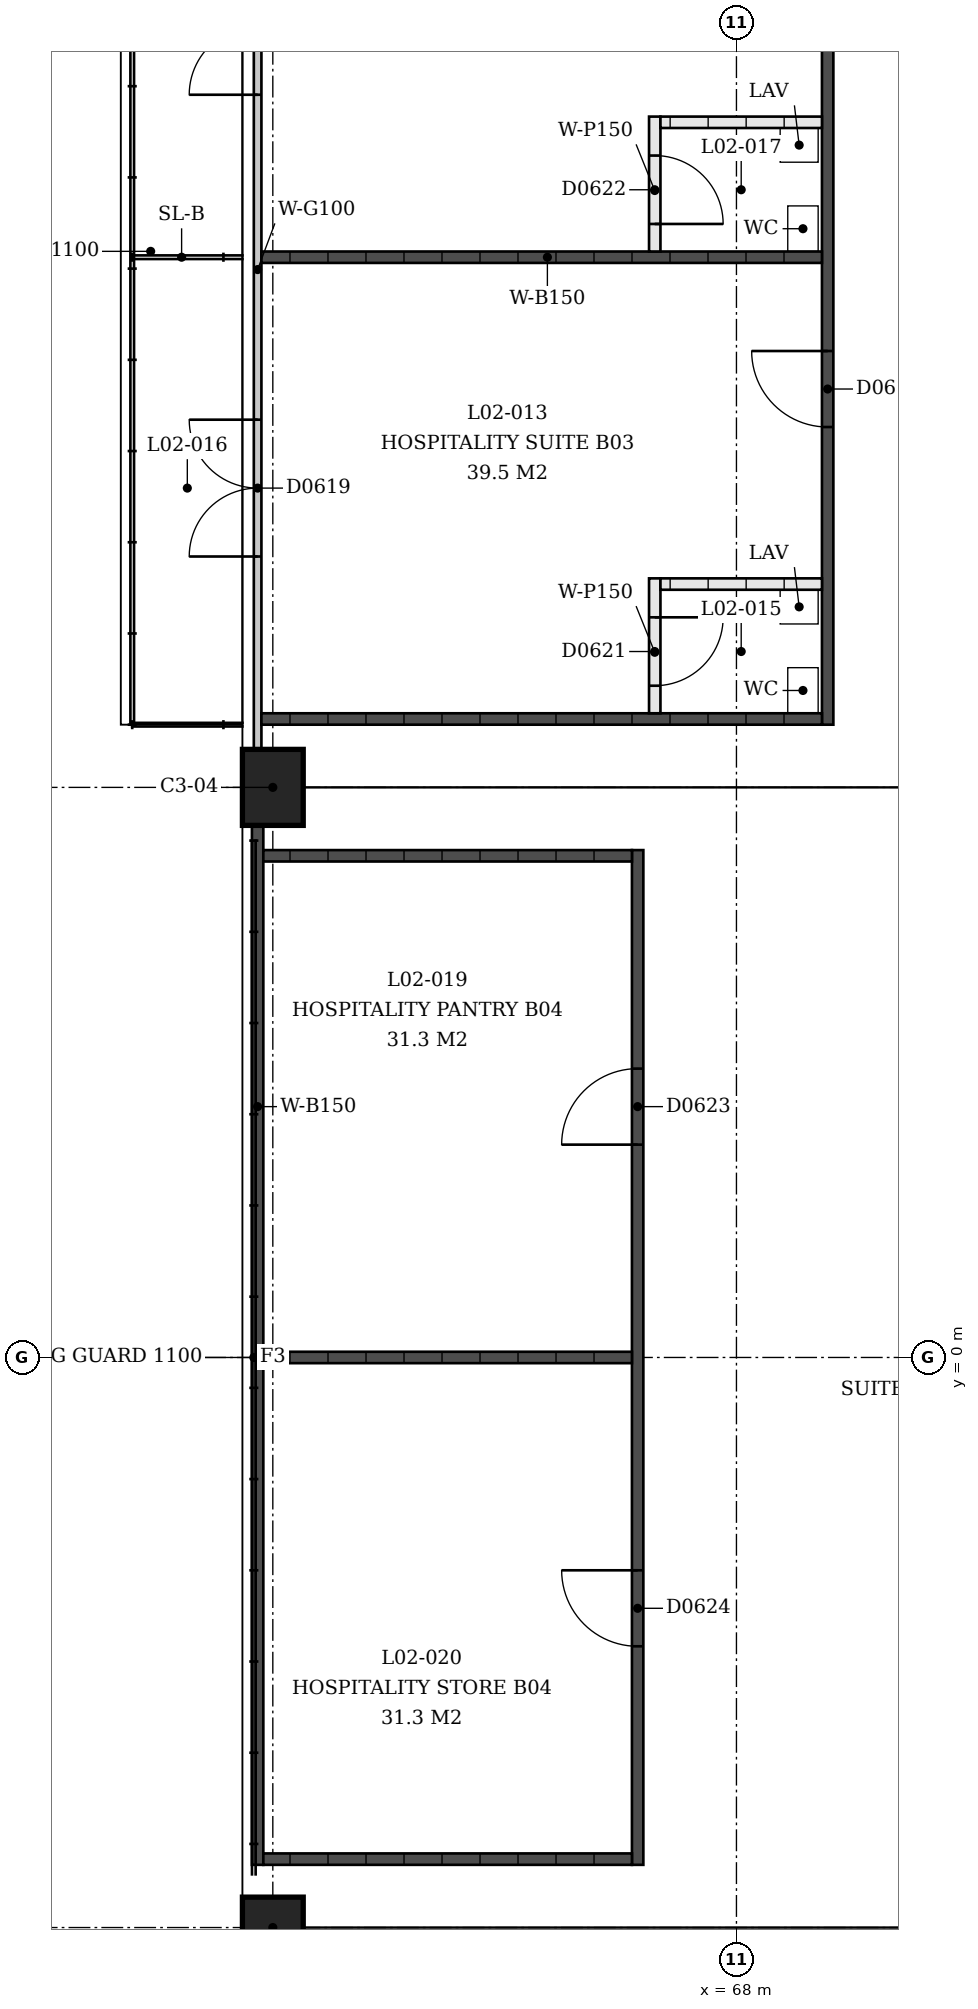
"""IFC4 building model, lengths in metres.
Left out: names, types, materials, properties, quantities, classifications, styles, units other than length and angle.
Written with IfcOpenShell. Run it as: python <this file> out.ifc"""

import sys

from ifc_helpers import new_model, si_unit, direction, frame, frame_2d, origin, origin_2d, place, context, subcontext, project, spatial, rectangle, extrude, element, fill, save


model = new_model("IFC4")
c1 = context("Model", 3, precision=1e-05, world=origin(), true_north=direction((0.0, 1.0)))
c2 = subcontext(c1, "Body", "Model", "MODEL_VIEW")
j1 = project(units=[si_unit("LENGTHUNIT", "METRE"), si_unit("PLANEANGLEUNIT", "RADIAN")], contexts=[c1])
p1 = place(None, origin())
s1 = spatial("IfcSite", under=j1, at=p1, CompositionType="ELEMENT")
p2 = place(p1, origin())
s2 = spatial("IfcBuilding", under=s1, at=p2, CompositionType="ELEMENT")
p3 = place(p2, frame((0.0, 0.0, 9.0)))
s3 = spatial("IfcBuildingStorey", under=s2, at=p3, CompositionType="ELEMENT", Elevation=9.0)
p4 = place(p3, frame((61.9, 7.5, 0.0), z_axis=(0.0, 0.0, 1.0), x_axis=(0.0, 1.0, 0.0)))
e1 = element("IfcColumn", 1, at=p4, inside=s3, PredefinedType="COLUMN", context=c2, shape_type="SweptSolid", body=[
    extrude(rectangle(XDim=1.0, YDim=0.8, at=origin_2d()), origin(), (0.0, 0.0, 1.0), 4.5),
])
p5 = place(p3, frame((61.9, -7.5, 0.0), z_axis=(0.0, 0.0, 1.0), x_axis=(0.0, 1.0, 0.0)))
e2 = element("IfcColumn", 2, at=p5, inside=s3, PredefinedType="COLUMN", context=c2, shape_type="SweptSolid", body=[
    extrude(rectangle(XDim=0.8, YDim=0.8, at=origin_2d()), origin(), (0.0, 0.0, 1.0), 4.5),
])
p6 = place(p3, frame((61.7, 8.0, 0.0), z_axis=(0.0, 0.0, 1.0), x_axis=(0.0, 1.0, 0.0)))
e3 = element("IfcWall", 3, at=p6, inside=s3, PredefinedType="PARTITIONING", context=c2, shape_type="SweptSolid", body=[
    extrude(rectangle(XDim=12.625, YDim=0.1, at=frame_2d((6.312, 0.0))), origin(), (0.0, 0.0, 1.0), 3.0),
])
p7 = place(p6, frame((2.538, 0.0, 0.0)))
e4 = element("IfcOpeningElement", 4, at=p7, cuts=e3, PredefinedType="OPENING", context=c2, shape_type="SweptSolid", body=[
    extrude(rectangle(XDim=1.8, YDim=2.1, at=frame_2d((0.9, 1.05))), frame((0.0, 0.05, 0.0), z_axis=(0.0, -1.0, 0.0), x_axis=(1.0, 0.0, 0.0)), (0.0, 0.0, 1.0), 0.1),
])
p8 = place(p6, frame((8.613, 0.0, 0.0)))
e5 = element("IfcOpeningElement", 5, at=p8, cuts=e3, PredefinedType="OPENING", context=c2, shape_type="SweptSolid", body=[
    extrude(rectangle(XDim=1.8, YDim=2.1, at=frame_2d((0.9, 1.05))), frame((0.0, 0.05, 0.0), z_axis=(0.0, -1.0, 0.0), x_axis=(1.0, 0.0, 0.0)), (0.0, 0.0, 1.0), 0.1),
])
p9 = place(p3, frame((69.2, 8.325, 0.0), z_axis=(0.0, 0.0, 1.0), x_axis=(0.0, 1.0, 0.0)))
e6 = element("IfcWall", 6, at=p9, inside=s3, PredefinedType="SOLIDWALL", context=c2, shape_type="SweptSolid", body=[
    extrude(rectangle(XDim=12.3, YDim=0.15, at=frame_2d((6.15, 0.0))), origin(), (0.0, 0.0, 1.0), 3.0),
])
p10 = place(p9, frame((3.916, 0.0, 0.0)))
e7 = element("IfcOpeningElement", 7, at=p10, cuts=e6, PredefinedType="OPENING", context=c2, shape_type="SweptSolid", body=[
    extrude(rectangle(XDim=1.0, YDim=2.1, at=frame_2d((0.5, 1.05))), frame((0.0, 0.075, 0.0), z_axis=(0.0, -1.0, 0.0), x_axis=(1.0, 0.0, 0.0)), (0.0, 0.0, 1.0), 0.15),
])
p11 = place(p9, frame((9.991, 0.0, 0.0)))
e8 = element("IfcOpeningElement", 8, at=p11, cuts=e6, PredefinedType="OPENING", context=c2, shape_type="SweptSolid", body=[
    extrude(rectangle(XDim=1.0, YDim=2.1, at=frame_2d((0.5, 1.05))), frame((0.0, 0.075, 0.0), z_axis=(0.0, -1.0, 0.0), x_axis=(1.0, 0.0, 0.0)), (0.0, 0.0, 1.0), 0.15),
])
for number, where, z_axis, x_axis in (
    (9, (61.75, 8.4, 0.0), (0.0, 0.0, 1.0), (1.0, 0.0, 0.0)),
    (10, (61.75, 14.475, 0.0), (0.0, 0.0, 1.0), (1.0, 0.0, 0.0)),
):
    element("IfcWall", number, at=place(p3, frame(where, z_axis=z_axis, x_axis=x_axis)), inside=s3, PredefinedType="SOLIDWALL", context=c2, shape_type="SweptSolid", body=[
        extrude(rectangle(XDim=7.375, YDim=0.15, at=frame_2d((3.688, 0.0))), origin(), (0.0, 0.0, 1.0), 3.0),
    ])
p12 = place(p3, frame((66.925, 8.475, 0.0), z_axis=(0.0, 0.0, 1.0), x_axis=(0.0, 1.0, 0.0)))
e11 = element("IfcWall", 11, at=p12, inside=s3, PredefinedType="PARTITIONING", context=c2, shape_type="SweptSolid", body=[
    extrude(rectangle(XDim=1.775, YDim=0.15, at=frame_2d((0.887, 0.0))), origin(), (0.0, 0.0, 1.0), 3.0),
])
p13 = place(p12, frame((0.363, 0.0, 0.0)))
e12 = element("IfcOpeningElement", 12, at=p13, cuts=e11, PredefinedType="OPENING", context=c2, shape_type="SweptSolid", body=[
    extrude(rectangle(XDim=0.9, YDim=2.1, at=frame_2d((0.45, 1.05))), frame((0.0, 0.075, 0.0), z_axis=(0.0, -1.0, 0.0), x_axis=(1.0, 0.0, 0.0)), (0.0, 0.0, 1.0), 0.15),
])
p14 = place(p3, frame((67.0, 10.175, 0.0), z_axis=(0.0, 0.0, 1.0), x_axis=(1.0, 0.0, 0.0)))
e13 = element("IfcWall", 13, at=p14, inside=s3, PredefinedType="PARTITIONING", context=c2, shape_type="SweptSolid", body=[
    extrude(rectangle(XDim=2.125, YDim=0.15, at=frame_2d((1.062, 0.0))), origin(), (0.0, 0.0, 1.0), 3.0),
])
p15 = place(p3, frame((66.925, 14.55, 0.0), z_axis=(0.0, 0.0, 1.0), x_axis=(0.0, 1.0, 0.0)))
e14 = element("IfcWall", 14, at=p15, inside=s3, PredefinedType="PARTITIONING", context=c2, shape_type="SweptSolid", body=[
    extrude(rectangle(XDim=1.775, YDim=0.15, at=frame_2d((0.887, 0.0))), origin(), (0.0, 0.0, 1.0), 3.0),
])
p16 = place(p15, frame((0.363, 0.0, 0.0)))
e15 = element("IfcOpeningElement", 15, at=p16, cuts=e14, PredefinedType="OPENING", context=c2, shape_type="SweptSolid", body=[
    extrude(rectangle(XDim=0.9, YDim=2.1, at=frame_2d((0.45, 1.05))), frame((0.0, 0.075, 0.0), z_axis=(0.0, -1.0, 0.0), x_axis=(1.0, 0.0, 0.0)), (0.0, 0.0, 1.0), 0.15),
])
p17 = place(p3, frame((67.0, 16.25, 0.0), z_axis=(0.0, 0.0, 1.0), x_axis=(1.0, 0.0, 0.0)))
e16 = element("IfcWall", 16, at=p17, inside=s3, PredefinedType="PARTITIONING", context=c2, shape_type="SweptSolid", body=[
    extrude(rectangle(XDim=2.125, YDim=0.15, at=frame_2d((1.062, 0.0))), origin(), (0.0, 0.0, 1.0), 3.0),
])
p18 = place(p3, frame((61.7, 7.0, 0.0), z_axis=(0.0, 0.0, 1.0), x_axis=(0.0, -1.0, 0.0)))
e17 = element("IfcWall", 17, at=p18, inside=s3, PredefinedType="SOLIDWALL", context=c2, shape_type="SweptSolid", body=[
    extrude(rectangle(XDim=13.675, YDim=0.15, at=frame_2d((6.837, 0.0))), origin(), (0.0, 0.0, 1.0), 3.0),
])
p19 = place(p3, frame((66.7, 6.675, 0.0), z_axis=(0.0, 0.0, 1.0), x_axis=(0.0, -1.0, 0.0)))
e18 = element("IfcWall", 18, at=p19, inside=s3, PredefinedType="SOLIDWALL", context=c2, shape_type="SweptSolid", body=[
    extrude(rectangle(XDim=13.35, YDim=0.15, at=frame_2d((6.675, 0.0))), origin(), (0.0, 0.0, 1.0), 3.0),
])
p20 = place(p19, frame((2.875, 0.0, 0.0)))
e19 = element("IfcOpeningElement", 19, at=p20, cuts=e18, PredefinedType="OPENING", context=c2, shape_type="SweptSolid", body=[
    extrude(rectangle(XDim=1.0, YDim=2.1, at=frame_2d((0.5, 1.05))), frame((0.0, 0.075, 0.0), z_axis=(0.0, -1.0, 0.0), x_axis=(1.0, 0.0, 0.0)), (0.0, 0.0, 1.0), 0.15),
])
p21 = place(p19, frame((9.475, 0.0, 0.0)))
e20 = element("IfcOpeningElement", 20, at=p21, cuts=e18, PredefinedType="OPENING", context=c2, shape_type="SweptSolid", body=[
    extrude(rectangle(XDim=1.0, YDim=2.1, at=frame_2d((0.5, 1.05))), frame((0.0, 0.075, 0.0), z_axis=(0.0, -1.0, 0.0), x_axis=(1.0, 0.0, 0.0)), (0.0, 0.0, 1.0), 0.15),
])
for number, where, z_axis, x_axis in (
    (21, (61.775, 6.6, 0.0), (0.0, 0.0, 1.0), (1.0, 0.0, 0.0)),
    (22, (61.775, 0.0, 0.0), (0.0, 0.0, 1.0), (1.0, 0.0, 0.0)),
    (23, (61.775, -6.6, 0.0), (0.0, 0.0, 1.0), (1.0, 0.0, 0.0)),
):
    element("IfcWall", number, at=place(p3, frame(where, z_axis=z_axis, x_axis=x_axis)), inside=s3, PredefinedType="SOLIDWALL", context=c2, shape_type="SweptSolid", body=[
        extrude(rectangle(XDim=4.85, YDim=0.15, at=frame_2d((2.425, 0.0))), origin(), (0.0, 0.0, 1.0), 3.0),
    ])
p22 = place(p10, origin())
e24 = element("IfcDoor", 24, at=p22, inside=s3, OperationType="SINGLE_SWING_LEFT", PredefinedType="DOOR", context=c2, shape_type="SweptSolid", body=[
    extrude(rectangle(XDim=1.0, YDim=2.1, at=frame_2d((0.5, 1.05))), frame((0.0, 0.025, 0.0), z_axis=(0.0, -1.0, 0.0), x_axis=(1.0, 0.0, 0.0)), (0.0, 0.0, 1.0), 0.05),
])
fill(e7, e24)
p23 = place(p7, origin())
e25 = element("IfcDoor", 25, at=p23, inside=s3, OperationType="DOUBLE_DOOR_SINGLE_SWING", PredefinedType="DOOR", context=c2, shape_type="SweptSolid", body=[
    extrude(rectangle(XDim=1.8, YDim=2.1, at=frame_2d((0.9, 1.05))), frame((0.0, 0.025, 0.0), z_axis=(0.0, -1.0, 0.0), x_axis=(1.0, 0.0, 0.0)), (0.0, 0.0, 1.0), 0.05),
])
fill(e4, e25)
p24 = place(p8, origin())
e26 = element("IfcDoor", 26, at=p24, inside=s3, OperationType="DOUBLE_DOOR_SINGLE_SWING", PredefinedType="DOOR", context=c2, shape_type="SweptSolid", body=[
    extrude(rectangle(XDim=1.8, YDim=2.1, at=frame_2d((0.9, 1.05))), frame((0.0, 0.025, 0.0), z_axis=(0.0, -1.0, 0.0), x_axis=(1.0, 0.0, 0.0)), (0.0, 0.0, 1.0), 0.05),
])
fill(e5, e26)
p25 = place(p13, origin())
e27 = element("IfcDoor", 27, at=p25, inside=s3, OperationType="SINGLE_SWING_RIGHT", PredefinedType="DOOR", context=c2, shape_type="SweptSolid", body=[
    extrude(rectangle(XDim=0.9, YDim=2.1, at=frame_2d((0.45, 1.05))), frame((0.0, 0.025, 0.0), z_axis=(0.0, -1.0, 0.0), x_axis=(1.0, 0.0, 0.0)), (0.0, 0.0, 1.0), 0.05),
])
fill(e12, e27)
p26 = place(p16, origin())
e28 = element("IfcDoor", 28, at=p26, inside=s3, OperationType="SINGLE_SWING_LEFT", PredefinedType="DOOR", context=c2, shape_type="SweptSolid", body=[
    extrude(rectangle(XDim=0.9, YDim=2.1, at=frame_2d((0.45, 1.05))), frame((0.0, 0.025, 0.0), z_axis=(0.0, -1.0, 0.0), x_axis=(1.0, 0.0, 0.0)), (0.0, 0.0, 1.0), 0.05),
])
fill(e15, e28)
p27 = place(p20, origin())
e29 = element("IfcDoor", 29, at=p27, inside=s3, OperationType="SINGLE_SWING_RIGHT", PredefinedType="DOOR", context=c2, shape_type="SweptSolid", body=[
    extrude(rectangle(XDim=1.0, YDim=2.1, at=frame_2d((0.5, 1.05))), frame((0.0, 0.025, 0.0), z_axis=(0.0, -1.0, 0.0), x_axis=(1.0, 0.0, 0.0)), (0.0, 0.0, 1.0), 0.05),
])
fill(e19, e29)
p28 = place(p21, origin())
e30 = element("IfcDoor", 30, at=p28, inside=s3, OperationType="SINGLE_SWING_LEFT", PredefinedType="DOOR", context=c2, shape_type="SweptSolid", body=[
    extrude(rectangle(XDim=1.0, YDim=2.1, at=frame_2d((0.5, 1.05))), frame((0.0, 0.025, 0.0), z_axis=(0.0, -1.0, 0.0), x_axis=(1.0, 0.0, 0.0)), (0.0, 0.0, 1.0), 0.05),
])
fill(e20, e30)
save(model, sys.argv[1])
